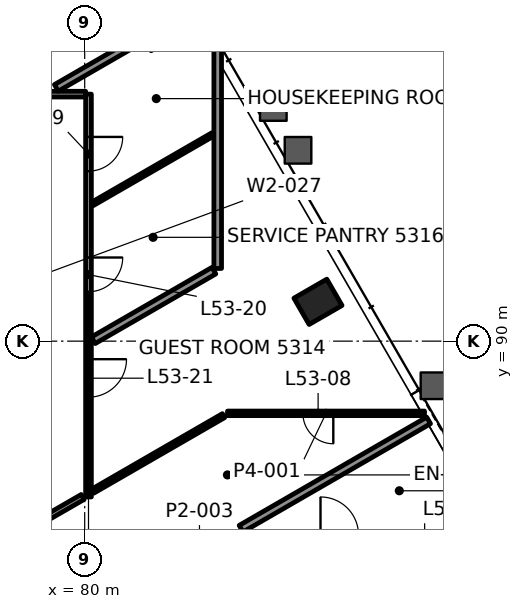
"""IFC4 building model, lengths in metres.
Left out: names, types, materials, properties, quantities, classifications, styles, units other than length and angle.
Written with IfcOpenShell. Run it as: python <this file> out.ifc"""

import sys

from ifc_helpers import new_model, si_unit, direction, frame, frame_2d, origin, origin_2d, place, context, subcontext, project, spatial, rectangle, hollow_rectangle, extrude, element, fill, save


model = new_model("IFC4")
c1 = context("Model", 3, precision=1e-05, world=origin(), true_north=direction((0.0, 1.0)))
c2 = subcontext(c1, "Body", "Model", "MODEL_VIEW")
j1 = project(units=[si_unit("LENGTHUNIT", "METRE"), si_unit("PLANEANGLEUNIT", "RADIAN")], contexts=[c1])
p1 = place(None, origin())
s1 = spatial("IfcSite", under=j1, at=p1, CompositionType="ELEMENT")
p2 = place(p1, origin())
s2 = spatial("IfcBuilding", under=s1, at=p2, CompositionType="ELEMENT")
p3 = place(p2, frame((0.0, 0.0, 226.0)))
s3 = spatial("IfcBuildingStorey", under=s2, at=p3, CompositionType="ELEMENT", Elevation=226.0)
p4 = place(p3, frame((86.138, 91.035, -0.0), z_axis=(0.0, 0.0, 1.0), x_axis=(-0.5, 0.866025403784, 0.0)))
e1 = element("IfcColumn", 1, at=p4, inside=s3, PredefinedType="COLUMN", context=c2, shape_type="SweptSolid", body=[
    extrude(hollow_rectangle(XDim=0.8, YDim=1.0, WallThickness=0.05, at=origin_2d()), origin(), (0.0, 0.0, 1.0), 3.9),
])
p5 = place(p3, frame((88.941, 88.1, 0.0), z_axis=(0.0, 0.0, 1.0), x_axis=(-1.0, 0.0, 0.0)))
e2 = element("IfcWall", 2, at=p5, inside=s3, PredefinedType="PARTITIONING", context=c2, shape_type="SweptSolid", body=[
    extrude(rectangle(XDim=5.183, YDim=0.12, at=frame_2d((2.592, 0.0))), origin(), (0.0, 0.0, 1.0), 3.022),
])
p6 = place(p5, frame((2.399, 0.0, 0.0)))
e3 = element("IfcOpeningElement", 3, at=p6, cuts=e2, PredefinedType="OPENING", context=c2, shape_type="SweptSolid", body=[
    extrude(rectangle(XDim=0.8, YDim=2.1, at=frame_2d((0.4, 1.05))), frame((0.0, 0.07, 0.0), z_axis=(0.0, -1.0, 0.0), x_axis=(1.0, 0.0, 0.0)), (0.0, 0.0, 1.0), 0.14),
])
p7 = place(p3, frame((75.975, 96.5, 0.0), z_axis=(0.0, 0.0, 1.0), x_axis=(1.0, 0.0, 0.0)))
e4 = element("IfcWall", 4, at=p7, inside=s3, PredefinedType="PARTITIONING", context=c2, shape_type="SweptSolid", body=[
    extrude(rectangle(XDim=4.049, YDim=0.15, at=frame_2d((2.025, 0.0))), origin(), (0.0, 0.0, 1.0), 3.1),
])
p8 = place(p3, frame((84.115, 85.065, 0.0), z_axis=(0.0, 0.0, 1.0), x_axis=(0.866027152591, 0.499996970966, 0.0)))
e5 = element("IfcWall", 5, at=p8, inside=s3, PredefinedType="PARTITIONING", context=c2, shape_type="SweptSolid", body=[
    extrude(rectangle(XDim=5.697, YDim=0.2, at=frame_2d((2.848, 0.0))), origin(), (0.0, 0.0, 1.0), 3.022),
])
p9 = place(p3, frame((78.458, 85.04, 0.0), z_axis=(0.0, 0.0, 1.0), x_axis=(0.865989383878, 0.500062383118, 0.0)))
e6 = element("IfcWall", 6, at=p9, inside=s3, PredefinedType="PARTITIONING", context=c2, shape_type="SweptSolid", body=[
    extrude(rectangle(XDim=1.72, YDim=0.15, at=frame_2d((0.86, 0.0))), origin(), (0.0, 0.0, 1.0), 3.1),
])
p10 = place(p3, frame((80.209, 86.052, 0.0), z_axis=(0.0, 0.0, 1.0), x_axis=(0.866032250876, 0.499988140302, 0.0)))
e7 = element("IfcWall", 7, at=p10, inside=s3, PredefinedType="PARTITIONING", context=c2, shape_type="SweptSolid", body=[
    extrude(rectangle(XDim=3.977, YDim=0.12, at=frame_2d((1.989, 0.0))), origin(), (0.0, 0.0, 1.0), 3.1),
])
p11 = place(p3, frame((80.227, 90.023, 0.0), z_axis=(0.0, 0.0, 1.0), x_axis=(0.866020252061, 0.500008922941, 0.0)))
e8 = element("IfcWall", 8, at=p11, inside=s3, PredefinedType="PARTITIONING", context=c2, shape_type="SweptSolid", body=[
    extrude(rectangle(XDim=3.664, YDim=0.2, at=frame_2d((1.832, 0.0))), origin(), (0.0, 0.0, 1.0), 3.1),
])
p12 = place(p3, frame((80.201, 93.61, 0.0), z_axis=(0.0, 0.0, 1.0), x_axis=(0.866020252061, 0.500008922941, 0.0)))
e9 = element("IfcWall", 9, at=p12, inside=s3, PredefinedType="PARTITIONING", context=c2, shape_type="SweptSolid", body=[
    extrude(rectangle(XDim=3.664, YDim=0.1, at=frame_2d((1.832, 0.0))), origin(), (0.0, 0.0, 1.0), 3.1),
])
p13 = place(p3, frame((79.255, 96.665, 0.0), z_axis=(0.0, 0.0, 1.0), x_axis=(0.866048852527, 0.499959383386, 0.0)))
e10 = element("IfcWall", 10, at=p13, inside=s3, PredefinedType="PARTITIONING", context=c2, shape_type="SweptSolid", body=[
    extrude(rectangle(XDim=2.646, YDim=0.2, at=frame_2d((1.323, 0.0))), origin(), (0.0, 0.0, 1.0), 3.1),
])
p14 = place(p3, frame((83.5, 91.913, 0.0), z_axis=(0.0, 0.0, 1.0), x_axis=(0.0, 1.0, 0.0)))
e11 = element("IfcWall", 11, at=p14, inside=s3, PredefinedType="PARTITIONING", context=c2, shape_type="SweptSolid", body=[
    extrude(rectangle(XDim=5.892, YDim=0.2, at=frame_2d((2.946, 0.0))), origin(), (0.0, 0.0, 1.0), 3.022),
])
p15 = place(p3, frame((80.1, 96.5, 0.0), z_axis=(0.0, 0.0, 1.0), x_axis=(0.0, -1.0, 0.0)))
e12 = element("IfcWall", 12, at=p15, inside=s3, PredefinedType="PARTITIONING", context=c2, shape_type="SweptSolid", body=[
    extrude(rectangle(XDim=10.6, YDim=0.15, at=frame_2d((5.3, 0.0))), origin(), (0.0, 0.0, 1.0), 3.1),
])
p16 = place(p15, frame((1.125, 0.0, 0.0)))
e13 = element("IfcOpeningElement", 13, at=p16, cuts=e12, PredefinedType="OPENING", context=c2, shape_type="SweptSolid", body=[
    extrude(rectangle(XDim=0.9, YDim=2.1, at=frame_2d((0.45, 1.05))), frame((0.0, 0.085, 0.0), z_axis=(0.0, -1.0, 0.0), x_axis=(1.0, 0.0, 0.0)), (0.0, 0.0, 1.0), 0.17),
])
p17 = place(p15, frame((4.299, 0.0, 0.0)))
e14 = element("IfcOpeningElement", 14, at=p17, cuts=e12, PredefinedType="OPENING", context=c2, shape_type="SweptSolid", body=[
    extrude(rectangle(XDim=0.9, YDim=2.1, at=frame_2d((0.45, 1.05))), frame((0.0, 0.085, 0.0), z_axis=(0.0, -1.0, 0.0), x_axis=(1.0, 0.0, 0.0)), (0.0, 0.0, 1.0), 0.17),
])
p18 = place(p15, frame((6.974, 0.0, 0.0)))
e15 = element("IfcOpeningElement", 15, at=p18, cuts=e12, PredefinedType="OPENING", context=c2, shape_type="SweptSolid", body=[
    extrude(rectangle(XDim=1.0, YDim=2.1, at=frame_2d((0.5, 1.05))), frame((0.0, 0.085, 0.0), z_axis=(0.0, -1.0, 0.0), x_axis=(1.0, 0.0, 0.0)), (0.0, 0.0, 1.0), 0.17),
])
p19 = place(p6, origin())
e16 = element("IfcDoor", 16, at=p19, inside=s3, OperationType="SINGLE_SWING_LEFT", PredefinedType="DOOR", context=c2, shape_type="SweptSolid", body=[
    extrude(rectangle(XDim=0.8, YDim=2.1, at=frame_2d((0.4, 1.05))), frame((0.0, 0.025, 0.0), z_axis=(0.0, -1.0, 0.0), x_axis=(1.0, 0.0, 0.0)), (0.0, 0.0, 1.0), 0.05),
])
fill(e3, e16)
p20 = place(p16, origin())
e17 = element("IfcDoor", 17, at=p20, inside=s3, OperationType="SINGLE_SWING_LEFT", PredefinedType="DOOR", context=c2, shape_type="SweptSolid", body=[
    extrude(rectangle(XDim=0.9, YDim=2.1, at=frame_2d((0.45, 1.05))), frame((0.0, 0.025, 0.0), z_axis=(0.0, -1.0, 0.0), x_axis=(1.0, 0.0, 0.0)), (0.0, 0.0, 1.0), 0.05),
])
fill(e13, e17)
p21 = place(p17, origin())
e18 = element("IfcDoor", 18, at=p21, inside=s3, OperationType="SINGLE_SWING_RIGHT", PredefinedType="DOOR", context=c2, shape_type="SweptSolid", body=[
    extrude(rectangle(XDim=0.9, YDim=2.1, at=frame_2d((0.45, 1.05))), frame((0.0, 0.025, 0.0), z_axis=(0.0, -1.0, 0.0), x_axis=(1.0, 0.0, 0.0)), (0.0, 0.0, 1.0), 0.05),
])
fill(e14, e18)
p22 = place(p18, origin())
e19 = element("IfcDoor", 19, at=p22, inside=s3, OperationType="SINGLE_SWING_RIGHT", PredefinedType="DOOR", context=c2, shape_type="SweptSolid", body=[
    extrude(rectangle(XDim=1.0, YDim=2.1, at=frame_2d((0.5, 1.05))), frame((0.0, 0.025, 0.0), z_axis=(0.0, -1.0, 0.0), x_axis=(1.0, 0.0, 0.0)), (0.0, 0.0, 1.0), 0.05),
])
fill(e15, e19)
save(model, sys.argv[1])
